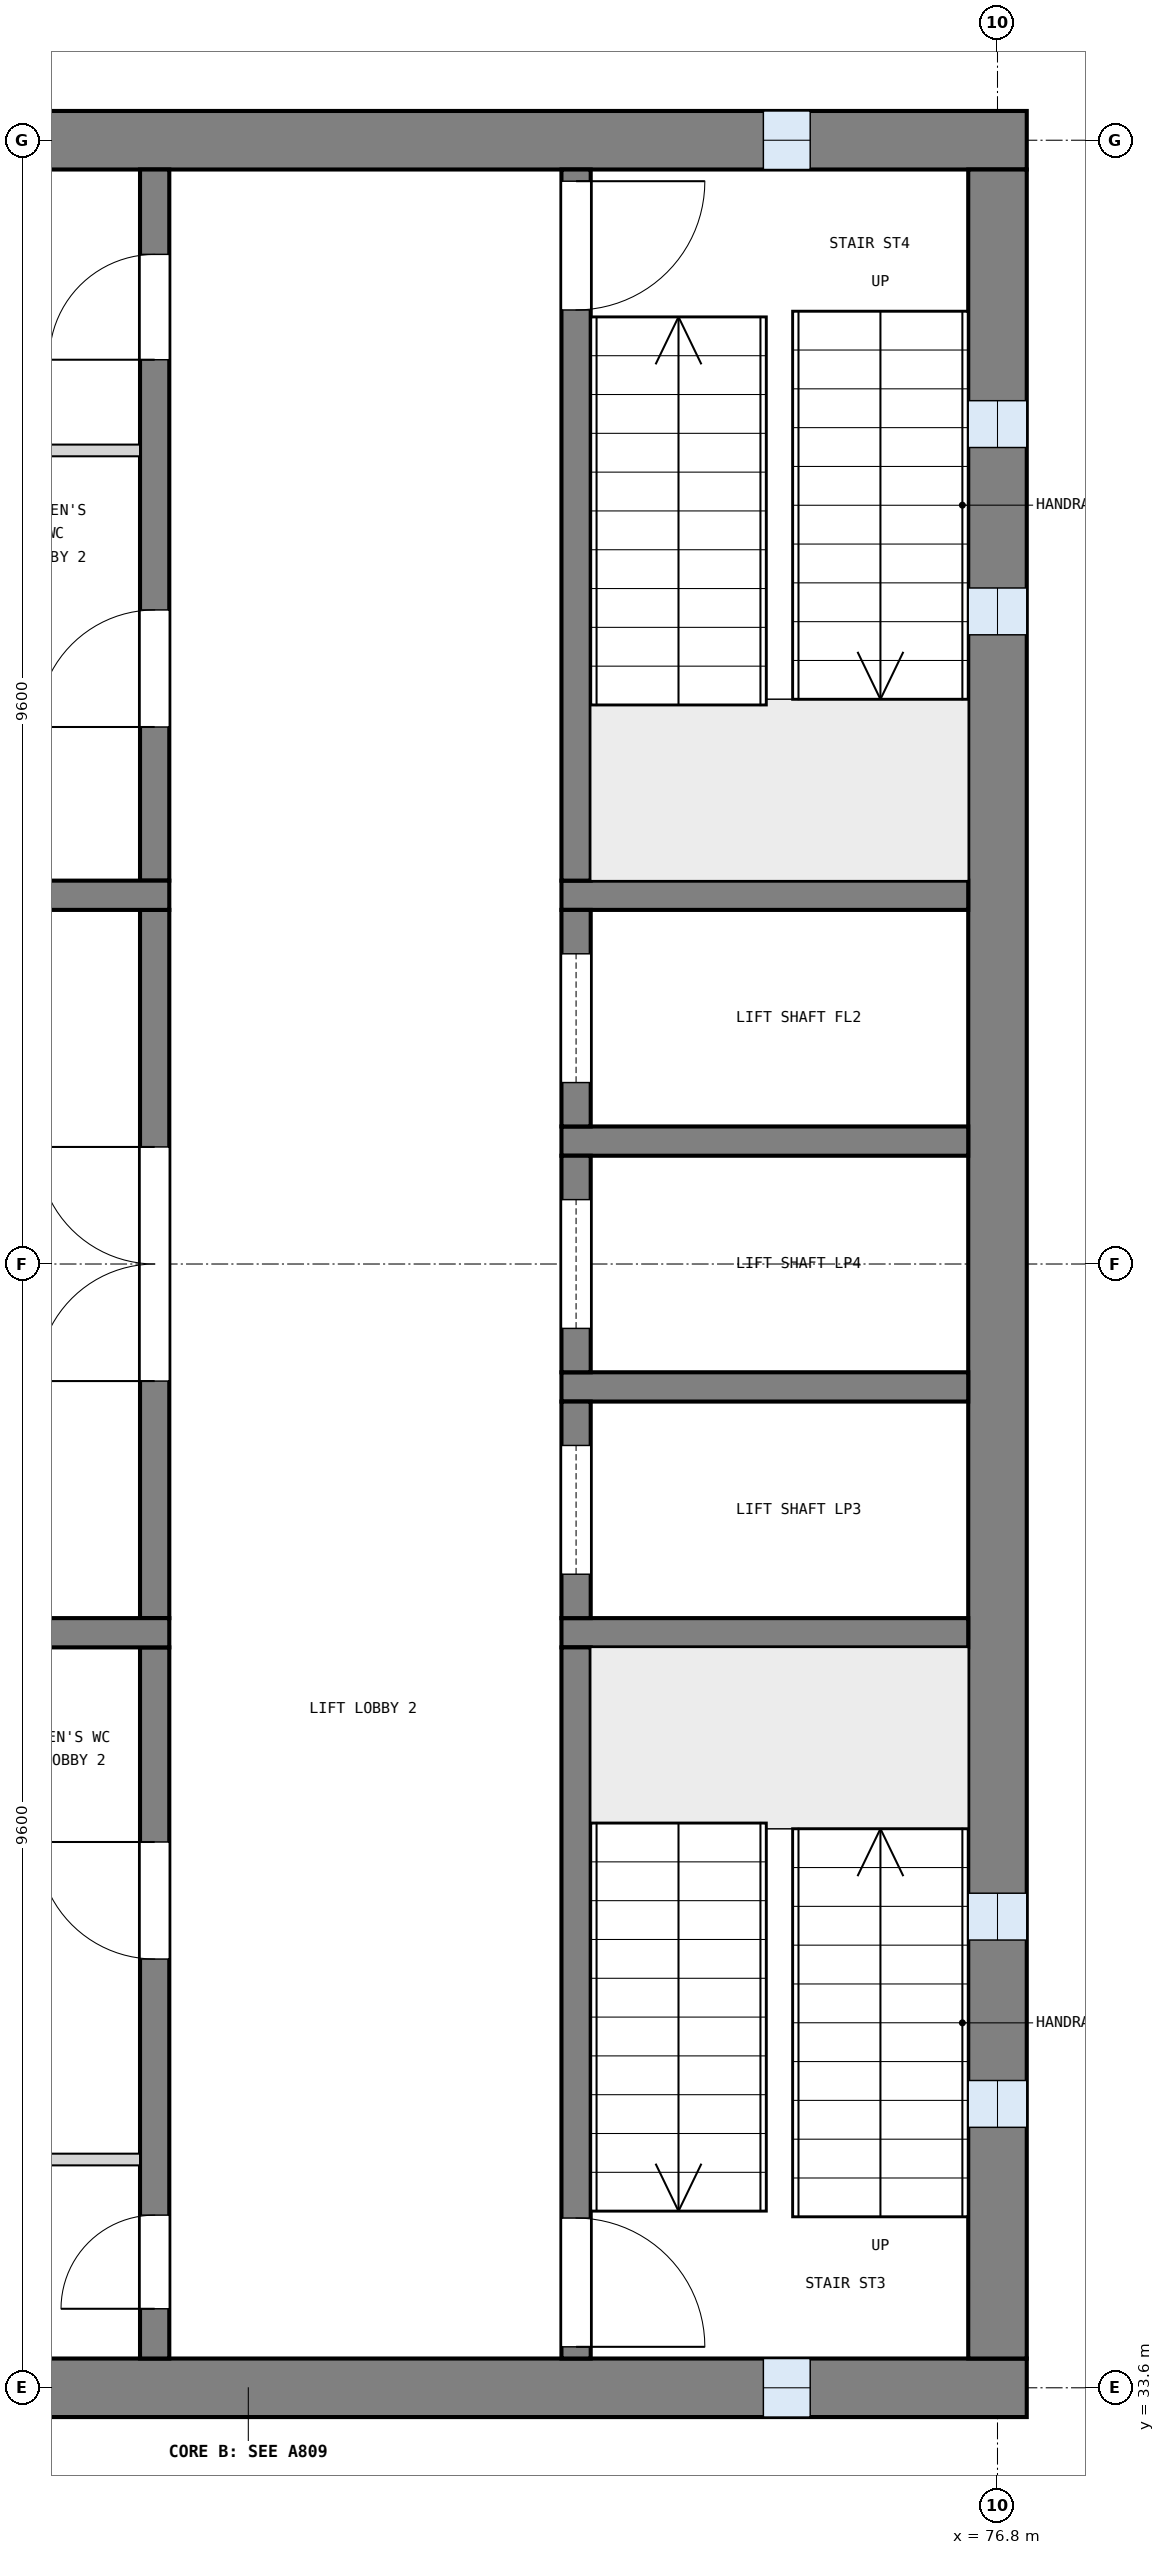
"""IFC4 building model, lengths in metres.
Left out: names, types, materials, properties, quantities, classifications, styles, units other than length and angle.
Written with IfcOpenShell. Run it as: python <this file> out.ifc"""

import sys

from ifc_helpers import new_model, si_unit, direction, frame, frame_2d, origin, place, context, subcontext, project, spatial, rectangle, extrude, element, fill, save


model = new_model("IFC4")
c1 = context("Model", 3, precision=1e-05, world=origin(), true_north=direction((0.0, 1.0)))
c2 = subcontext(c1, "Body", "Model", "MODEL_VIEW")
j1 = project(units=[si_unit("LENGTHUNIT", "METRE"), si_unit("PLANEANGLEUNIT", "RADIAN")], contexts=[c1])
p1 = place(None, origin())
s1 = spatial("IfcSite", under=j1, at=p1, CompositionType="ELEMENT")
p2 = place(p1, origin())
s2 = spatial("IfcBuilding", under=s1, at=p2, CompositionType="ELEMENT")
p3 = place(p2, frame((0.0, 0.0, 28.8)))
s3 = spatial("IfcBuildingStorey", under=s2, at=p3, CompositionType="ELEMENT", Elevation=28.8)
p4 = place(p3, frame((63.75, 52.8, 0.0), z_axis=(0.0, 0.0, 1.0), x_axis=(1.0, 0.0, 0.0)))
e1 = element("IfcWall", 1, at=p4, inside=s3, PredefinedType="SHEAR", context=c2, shape_type="SweptSolid", body=[
    extrude(rectangle(XDim=13.3, YDim=0.5, at=frame_2d((6.65, 0.0))), origin(), (0.0, 0.0, 1.0), 3.9),
])
p5 = place(p4, frame((11.05, 0.0, 1.0)))
e2 = element("IfcOpeningElement", 2, at=p5, cuts=e1, PredefinedType="OPENING", context=c2, shape_type="SweptSolid", body=[
    extrude(rectangle(XDim=0.4, YDim=2.0, at=frame_2d((0.2, 1.0))), frame((0.0, 0.26, 0.0), z_axis=(0.0, -1.0, 0.0), x_axis=(1.0, 0.0, 0.0)), (0.0, 0.0, 1.0), 0.52),
])
p6 = place(p3, frame((63.75, 33.6, 0.0), z_axis=(0.0, 0.0, 1.0), x_axis=(1.0, 0.0, 0.0)))
e3 = element("IfcWall", 3, at=p6, inside=s3, PredefinedType="SHEAR", context=c2, shape_type="SweptSolid", body=[
    extrude(rectangle(XDim=13.3, YDim=0.5, at=frame_2d((6.65, 0.0))), origin(), (0.0, 0.0, 1.0), 3.9),
])
p7 = place(p6, frame((11.05, 0.0, 1.0)))
e4 = element("IfcOpeningElement", 4, at=p7, cuts=e3, PredefinedType="OPENING", context=c2, shape_type="SweptSolid", body=[
    extrude(rectangle(XDim=0.4, YDim=2.0, at=frame_2d((0.2, 1.0))), frame((0.0, 0.26, 0.0), z_axis=(0.0, -1.0, 0.0), x_axis=(1.0, 0.0, 0.0)), (0.0, 0.0, 1.0), 0.52),
])
p8 = place(p3, frame((76.8, 33.85, 0.0), z_axis=(0.0, 0.0, 1.0), x_axis=(0.0, 1.0, 0.0)))
e5 = element("IfcWall", 5, at=p8, inside=s3, PredefinedType="SHEAR", context=c2, shape_type="SweptSolid", body=[
    extrude(rectangle(XDim=18.7, YDim=0.5, at=frame_2d((9.35, 0.0))), origin(), (0.0, 0.0, 1.0), 3.9),
])
p9 = place(p8, frame((1.975, 0.0, 1.0)))
e6 = element("IfcOpeningElement", 6, at=p9, cuts=e5, PredefinedType="OPENING", context=c2, shape_type="SweptSolid", body=[
    extrude(rectangle(XDim=0.4, YDim=2.0, at=frame_2d((0.2, 1.0))), frame((0.0, 0.26, 0.0), z_axis=(0.0, -1.0, 0.0), x_axis=(1.0, 0.0, 0.0)), (0.0, 0.0, 1.0), 0.52),
])
p10 = place(p8, frame((3.575, 0.0, 1.0)))
e7 = element("IfcOpeningElement", 7, at=p10, cuts=e5, PredefinedType="OPENING", context=c2, shape_type="SweptSolid", body=[
    extrude(rectangle(XDim=0.4, YDim=2.0, at=frame_2d((0.2, 1.0))), frame((0.0, 0.26, 0.0), z_axis=(0.0, -1.0, 0.0), x_axis=(1.0, 0.0, 0.0)), (0.0, 0.0, 1.0), 0.52),
])
p11 = place(p8, frame((14.725, 0.0, 1.0)))
e8 = element("IfcOpeningElement", 8, at=p11, cuts=e5, PredefinedType="OPENING", context=c2, shape_type="SweptSolid", body=[
    extrude(rectangle(XDim=0.4, YDim=2.0, at=frame_2d((0.2, 1.0))), frame((0.0, 0.26, 0.0), z_axis=(0.0, -1.0, 0.0), x_axis=(1.0, 0.0, 0.0)), (0.0, 0.0, 1.0), 0.52),
])
p12 = place(p8, frame((16.325, 0.0, 1.0)))
e9 = element("IfcOpeningElement", 9, at=p12, cuts=e5, PredefinedType="OPENING", context=c2, shape_type="SweptSolid", body=[
    extrude(rectangle(XDim=0.4, YDim=2.0, at=frame_2d((0.2, 1.0))), frame((0.0, 0.26, 0.0), z_axis=(0.0, -1.0, 0.0), x_axis=(1.0, 0.0, 0.0)), (0.0, 0.0, 1.0), 0.52),
])
for number, where, z_axis, x_axis in (
    (10, (76.55, 40.05, 0.0), (0.0, 0.0, 1.0), (-1.0, 0.0, 0.0)),
    (11, (76.55, 42.15, 0.0), (0.0, 0.0, 1.0), (-1.0, 0.0, 0.0)),
    (12, (76.55, 44.25, 0.0), (0.0, 0.0, 1.0), (-1.0, 0.0, 0.0)),
    (13, (76.55, 46.35, 0.0), (0.0, 0.0, 1.0), (-1.0, 0.0, 0.0)),
):
    element("IfcWall", number, at=place(p3, frame(where, z_axis=z_axis, x_axis=x_axis)), inside=s3, PredefinedType="SOLIDWALL", context=c2, shape_type="SweptSolid", body=[
        extrude(rectangle(XDim=3.475, YDim=0.25, at=frame_2d((1.738, 0.0))), origin(), (0.0, 0.0, 1.0), 3.6),
    ])
p13 = place(p3, frame((73.2, 33.85, 0.0), z_axis=(0.0, 0.0, 1.0), x_axis=(0.0, 1.0, 0.0)))
e14 = element("IfcWall", 14, at=p13, inside=s3, PredefinedType="SOLIDWALL", context=c2, shape_type="SweptSolid", body=[
    extrude(rectangle(XDim=6.075, YDim=0.25, at=frame_2d((3.038, 0.0))), origin(), (0.0, 0.0, 1.0), 3.6),
])
p14 = place(p13, frame((0.1, 0.0, 0.0)))
e15 = element("IfcOpeningElement", 15, at=p14, cuts=e14, PredefinedType="OPENING", context=c2, shape_type="SweptSolid", body=[
    extrude(rectangle(XDim=1.1, YDim=2.1, at=frame_2d((0.55, 1.05))), frame((0.0, 0.135, 0.0), z_axis=(0.0, -1.0, 0.0), x_axis=(1.0, 0.0, 0.0)), (0.0, 0.0, 1.0), 0.27),
])
p15 = place(p3, frame((73.2, 40.175, 0.0), z_axis=(0.0, 0.0, 1.0), x_axis=(0.0, 1.0, 0.0)))
e16 = element("IfcWall", 16, at=p15, inside=s3, PredefinedType="SOLIDWALL", context=c2, shape_type="SweptSolid", body=[
    extrude(rectangle(XDim=1.85, YDim=0.25, at=frame_2d((0.925, 0.0))), origin(), (0.0, 0.0, 1.0), 3.6),
])
p16 = place(p15, frame((0.375, 0.0, 0.0)))
e17 = element("IfcOpeningElement", 17, at=p16, cuts=e16, PredefinedType="OPENING", context=c2, shape_type="SweptSolid", body=[
    extrude(rectangle(XDim=1.1, YDim=2.1, at=frame_2d((0.55, 1.05))), frame((0.0, 0.135, 0.0), z_axis=(0.0, -1.0, 0.0), x_axis=(1.0, 0.0, 0.0)), (0.0, 0.0, 1.0), 0.27),
])
p17 = place(p3, frame((73.2, 42.275, 0.0), z_axis=(0.0, 0.0, 1.0), x_axis=(0.0, 1.0, 0.0)))
e18 = element("IfcWall", 18, at=p17, inside=s3, PredefinedType="SOLIDWALL", context=c2, shape_type="SweptSolid", body=[
    extrude(rectangle(XDim=1.85, YDim=0.25, at=frame_2d((0.925, 0.0))), origin(), (0.0, 0.0, 1.0), 3.6),
])
p18 = place(p17, frame((0.375, 0.0, 0.0)))
e19 = element("IfcOpeningElement", 19, at=p18, cuts=e18, PredefinedType="OPENING", context=c2, shape_type="SweptSolid", body=[
    extrude(rectangle(XDim=1.1, YDim=2.1, at=frame_2d((0.55, 1.05))), frame((0.0, 0.135, 0.0), z_axis=(0.0, -1.0, 0.0), x_axis=(1.0, 0.0, 0.0)), (0.0, 0.0, 1.0), 0.27),
])
p19 = place(p3, frame((73.2, 44.375, 0.0), z_axis=(0.0, 0.0, 1.0), x_axis=(0.0, 1.0, 0.0)))
e20 = element("IfcWall", 20, at=p19, inside=s3, PredefinedType="SOLIDWALL", context=c2, shape_type="SweptSolid", body=[
    extrude(rectangle(XDim=1.85, YDim=0.25, at=frame_2d((0.925, 0.0))), origin(), (0.0, 0.0, 1.0), 3.6),
])
p20 = place(p19, frame((0.375, 0.0, 0.0)))
e21 = element("IfcOpeningElement", 21, at=p20, cuts=e20, PredefinedType="OPENING", context=c2, shape_type="SweptSolid", body=[
    extrude(rectangle(XDim=1.1, YDim=2.1, at=frame_2d((0.55, 1.05))), frame((0.0, 0.135, 0.0), z_axis=(0.0, -1.0, 0.0), x_axis=(1.0, 0.0, 0.0)), (0.0, 0.0, 1.0), 0.27),
])
p21 = place(p3, frame((73.2, 46.475, 0.0), z_axis=(0.0, 0.0, 1.0), x_axis=(0.0, 1.0, 0.0)))
e22 = element("IfcWall", 22, at=p21, inside=s3, PredefinedType="SOLIDWALL", context=c2, shape_type="SweptSolid", body=[
    extrude(rectangle(XDim=6.075, YDim=0.25, at=frame_2d((3.038, 0.0))), origin(), (0.0, 0.0, 1.0), 3.6),
])
p22 = place(p21, frame((4.875, 0.0, 0.0)))
e23 = element("IfcOpeningElement", 23, at=p22, cuts=e22, PredefinedType="OPENING", context=c2, shape_type="SweptSolid", body=[
    extrude(rectangle(XDim=1.1, YDim=2.1, at=frame_2d((0.55, 1.05))), frame((0.0, 0.135, 0.0), z_axis=(0.0, -1.0, 0.0), x_axis=(1.0, 0.0, 0.0)), (0.0, 0.0, 1.0), 0.27),
])
p23 = place(p3, frame((69.6, 33.85, 0.0), z_axis=(0.0, 0.0, 1.0), x_axis=(0.0, 1.0, 0.0)))
e24 = element("IfcWall", 24, at=p23, inside=s3, PredefinedType="SOLIDWALL", context=c2, shape_type="SweptSolid", body=[
    extrude(rectangle(XDim=6.075, YDim=0.25, at=frame_2d((3.038, 0.0))), origin(), (0.0, 0.0, 1.0), 3.6),
])
p24 = place(p23, frame((0.425, 0.0, 0.0)))
e25 = element("IfcOpeningElement", 25, at=p24, cuts=e24, PredefinedType="OPENING", context=c2, shape_type="SweptSolid", body=[
    extrude(rectangle(XDim=0.8, YDim=2.1, at=frame_2d((0.4, 1.05))), frame((0.0, 0.135, 0.0), z_axis=(0.0, -1.0, 0.0), x_axis=(1.0, 0.0, 0.0)), (0.0, 0.0, 1.0), 0.27),
])
p25 = place(p23, frame((3.413, 0.0, 0.0)))
e26 = element("IfcOpeningElement", 26, at=p25, cuts=e24, PredefinedType="OPENING", context=c2, shape_type="SweptSolid", body=[
    extrude(rectangle(XDim=1.0, YDim=2.1, at=frame_2d((0.5, 1.05))), frame((0.0, 0.135, 0.0), z_axis=(0.0, -1.0, 0.0), x_axis=(1.0, 0.0, 0.0)), (0.0, 0.0, 1.0), 0.27),
])
p26 = place(p3, frame((69.6, 40.175, 0.0), z_axis=(0.0, 0.0, 1.0), x_axis=(0.0, 1.0, 0.0)))
e27 = element("IfcWall", 27, at=p26, inside=s3, PredefinedType="SOLIDWALL", context=c2, shape_type="SweptSolid", body=[
    extrude(rectangle(XDim=6.05, YDim=0.25, at=frame_2d((3.025, 0.0))), origin(), (0.0, 0.0, 1.0), 3.6),
])
p27 = place(p26, frame((2.025, 0.0, 0.0)))
e28 = element("IfcOpeningElement", 28, at=p27, cuts=e27, PredefinedType="OPENING", context=c2, shape_type="SweptSolid", body=[
    extrude(rectangle(XDim=2.0, YDim=2.1, at=frame_2d((1.0, 1.05))), frame((0.0, 0.135, 0.0), z_axis=(0.0, -1.0, 0.0), x_axis=(1.0, 0.0, 0.0)), (0.0, 0.0, 1.0), 0.27),
])
p28 = place(p3, frame((69.6, 46.475, 0.0), z_axis=(0.0, 0.0, 1.0), x_axis=(0.0, 1.0, 0.0)))
e29 = element("IfcWall", 29, at=p28, inside=s3, PredefinedType="SOLIDWALL", context=c2, shape_type="SweptSolid", body=[
    extrude(rectangle(XDim=6.075, YDim=0.25, at=frame_2d((3.038, 0.0))), origin(), (0.0, 0.0, 1.0), 3.6),
])
p29 = place(p28, frame((1.312, 0.0, 0.0)))
e30 = element("IfcOpeningElement", 30, at=p29, cuts=e29, PredefinedType="OPENING", context=c2, shape_type="SweptSolid", body=[
    extrude(rectangle(XDim=1.0, YDim=2.1, at=frame_2d((0.5, 1.05))), frame((0.0, 0.135, 0.0), z_axis=(0.0, -1.0, 0.0), x_axis=(1.0, 0.0, 0.0)), (0.0, 0.0, 1.0), 0.27),
])
p30 = place(p28, frame((4.45, 0.0, 0.0)))
e31 = element("IfcOpeningElement", 31, at=p30, cuts=e29, PredefinedType="OPENING", context=c2, shape_type="SweptSolid", body=[
    extrude(rectangle(XDim=0.9, YDim=2.1, at=frame_2d((0.45, 1.05))), frame((0.0, 0.135, 0.0), z_axis=(0.0, -1.0, 0.0), x_axis=(1.0, 0.0, 0.0)), (0.0, 0.0, 1.0), 0.27),
])
for number, where, z_axis, x_axis in (
    (32, (69.725, 40.05, 0.0), (0.0, 0.0, 1.0), (-1.0, 0.0, 0.0)),
    (33, (69.725, 46.35, 0.0), (0.0, 0.0, 1.0), (-1.0, 0.0, 0.0)),
):
    element("IfcWall", number, at=place(p3, frame(where, z_axis=z_axis, x_axis=x_axis)), inside=s3, PredefinedType="SOLIDWALL", context=c2, shape_type="SweptSolid", body=[
        extrude(rectangle(XDim=5.475, YDim=0.25, at=frame_2d((2.738, 0.0))), origin(), (0.0, 0.0, 1.0), 3.6),
    ])
for number, where, z_axis, x_axis in (
    (34, (69.475, 35.55, 0.0), (0.0, 0.0, 1.0), (-1.0, 0.0, 0.0)),
    (35, (69.475, 50.15, 0.0), (0.0, 0.0, 1.0), (-1.0, 0.0, 0.0)),
):
    element("IfcWall", number, at=place(p3, frame(where, z_axis=z_axis, x_axis=x_axis)), inside=s3, PredefinedType="PARTITIONING", context=c2, shape_type="SweptSolid", body=[
        extrude(rectangle(XDim=5.225, YDim=0.1, at=frame_2d((2.613, 0.0))), origin(), (0.0, 0.0, 1.0), 3.6),
    ])
p31 = place(p9, origin())
e36 = element("IfcWindow", 36, at=p31, inside=s3, PartitioningType="SINGLE_PANEL", PredefinedType="WINDOW", context=c2, shape_type="SweptSolid", body=[
    extrude(rectangle(XDim=0.4, YDim=2.0, at=frame_2d((0.2, 1.0))), frame((0.0, 0.03, 0.0), z_axis=(0.0, -1.0, 0.0), x_axis=(1.0, 0.0, 0.0)), (0.0, 0.0, 1.0), 0.06),
])
fill(e6, e36)
p32 = place(p10, origin())
e37 = element("IfcWindow", 37, at=p32, inside=s3, PartitioningType="SINGLE_PANEL", PredefinedType="WINDOW", context=c2, shape_type="SweptSolid", body=[
    extrude(rectangle(XDim=0.4, YDim=2.0, at=frame_2d((0.2, 1.0))), frame((0.0, 0.03, 0.0), z_axis=(0.0, -1.0, 0.0), x_axis=(1.0, 0.0, 0.0)), (0.0, 0.0, 1.0), 0.06),
])
fill(e7, e37)
p33 = place(p11, origin())
e38 = element("IfcWindow", 38, at=p33, inside=s3, PartitioningType="SINGLE_PANEL", PredefinedType="WINDOW", context=c2, shape_type="SweptSolid", body=[
    extrude(rectangle(XDim=0.4, YDim=2.0, at=frame_2d((0.2, 1.0))), frame((0.0, 0.03, 0.0), z_axis=(0.0, -1.0, 0.0), x_axis=(1.0, 0.0, 0.0)), (0.0, 0.0, 1.0), 0.06),
])
fill(e8, e38)
p34 = place(p12, origin())
e39 = element("IfcWindow", 39, at=p34, inside=s3, PartitioningType="SINGLE_PANEL", PredefinedType="WINDOW", context=c2, shape_type="SweptSolid", body=[
    extrude(rectangle(XDim=0.4, YDim=2.0, at=frame_2d((0.2, 1.0))), frame((0.0, 0.03, 0.0), z_axis=(0.0, -1.0, 0.0), x_axis=(1.0, 0.0, 0.0)), (0.0, 0.0, 1.0), 0.06),
])
fill(e9, e39)
p35 = place(p7, origin())
e40 = element("IfcWindow", 40, at=p35, inside=s3, PartitioningType="SINGLE_PANEL", PredefinedType="WINDOW", context=c2, shape_type="SweptSolid", body=[
    extrude(rectangle(XDim=0.4, YDim=2.0, at=frame_2d((0.2, 1.0))), frame((0.0, 0.03, 0.0), z_axis=(0.0, -1.0, 0.0), x_axis=(1.0, 0.0, 0.0)), (0.0, 0.0, 1.0), 0.06),
])
fill(e4, e40)
p36 = place(p5, origin())
e41 = element("IfcWindow", 41, at=p36, inside=s3, PartitioningType="SINGLE_PANEL", PredefinedType="WINDOW", context=c2, shape_type="SweptSolid", body=[
    extrude(rectangle(XDim=0.4, YDim=2.0, at=frame_2d((0.2, 1.0))), frame((0.0, 0.03, 0.0), z_axis=(0.0, -1.0, 0.0), x_axis=(1.0, 0.0, 0.0)), (0.0, 0.0, 1.0), 0.06),
])
fill(e2, e41)
p37 = place(p14, frame((1.1, 0.0, 0.0), z_axis=(0.0, 0.0, 1.0), x_axis=(-1.0, 0.0, 0.0)))
e42 = element("IfcDoor", 42, at=p37, inside=s3, OperationType="SINGLE_SWING_RIGHT", PredefinedType="DOOR", context=c2, shape_type="SweptSolid", body=[
    extrude(rectangle(XDim=1.1, YDim=2.1, at=frame_2d((0.55, 1.05))), frame((0.0, 0.025, 0.0), z_axis=(0.0, -1.0, 0.0), x_axis=(1.0, 0.0, 0.0)), (0.0, 0.0, 1.0), 0.05),
])
fill(e15, e42)
p38 = place(p22, frame((1.1, 0.0, 0.0), z_axis=(0.0, 0.0, 1.0), x_axis=(-1.0, 0.0, 0.0)))
e43 = element("IfcDoor", 43, at=p38, inside=s3, OperationType="SINGLE_SWING_LEFT", PredefinedType="DOOR", context=c2, shape_type="SweptSolid", body=[
    extrude(rectangle(XDim=1.1, YDim=2.1, at=frame_2d((0.55, 1.05))), frame((0.0, 0.025, 0.0), z_axis=(0.0, -1.0, 0.0), x_axis=(1.0, 0.0, 0.0)), (0.0, 0.0, 1.0), 0.05),
])
fill(e23, e43)
p39 = place(p16, origin())
e44 = element("IfcDoor", 44, at=p39, inside=s3, OperationType="SLIDING_TO_LEFT", PredefinedType="DOOR", context=c2, shape_type="SweptSolid", body=[
    extrude(rectangle(XDim=1.1, YDim=2.1, at=frame_2d((0.55, 1.05))), frame((0.0, 0.025, 0.0), z_axis=(0.0, -1.0, 0.0), x_axis=(1.0, 0.0, 0.0)), (0.0, 0.0, 1.0), 0.05),
])
fill(e17, e44)
p40 = place(p18, origin())
e45 = element("IfcDoor", 45, at=p40, inside=s3, OperationType="SLIDING_TO_LEFT", PredefinedType="DOOR", context=c2, shape_type="SweptSolid", body=[
    extrude(rectangle(XDim=1.1, YDim=2.1, at=frame_2d((0.55, 1.05))), frame((0.0, 0.025, 0.0), z_axis=(0.0, -1.0, 0.0), x_axis=(1.0, 0.0, 0.0)), (0.0, 0.0, 1.0), 0.05),
])
fill(e19, e45)
p41 = place(p20, origin())
e46 = element("IfcDoor", 46, at=p41, inside=s3, OperationType="SLIDING_TO_LEFT", PredefinedType="DOOR", context=c2, shape_type="SweptSolid", body=[
    extrude(rectangle(XDim=1.1, YDim=2.1, at=frame_2d((0.55, 1.05))), frame((0.0, 0.025, 0.0), z_axis=(0.0, -1.0, 0.0), x_axis=(1.0, 0.0, 0.0)), (0.0, 0.0, 1.0), 0.05),
])
fill(e21, e46)
p42 = place(p27, origin())
e47 = element("IfcDoor", 47, at=p42, inside=s3, OperationType="DOUBLE_DOOR_SINGLE_SWING", PredefinedType="DOOR", context=c2, shape_type="SweptSolid", body=[
    extrude(rectangle(XDim=2.0, YDim=2.1, at=frame_2d((1.0, 1.05))), frame((0.0, 0.025, 0.0), z_axis=(0.0, -1.0, 0.0), x_axis=(1.0, 0.0, 0.0)), (0.0, 0.0, 1.0), 0.05),
])
fill(e28, e47)
p43 = place(p24, origin())
e48 = element("IfcDoor", 48, at=p43, inside=s3, OperationType="SINGLE_SWING_LEFT", PredefinedType="DOOR", context=c2, shape_type="SweptSolid", body=[
    extrude(rectangle(XDim=0.8, YDim=2.1, at=frame_2d((0.4, 1.05))), frame((0.0, 0.025, 0.0), z_axis=(0.0, -1.0, 0.0), x_axis=(1.0, 0.0, 0.0)), (0.0, 0.0, 1.0), 0.05),
])
fill(e25, e48)
p44 = place(p25, origin())
e49 = element("IfcDoor", 49, at=p44, inside=s3, OperationType="SINGLE_SWING_RIGHT", PredefinedType="DOOR", context=c2, shape_type="SweptSolid", body=[
    extrude(rectangle(XDim=1.0, YDim=2.1, at=frame_2d((0.5, 1.05))), frame((0.0, 0.025, 0.0), z_axis=(0.0, -1.0, 0.0), x_axis=(1.0, 0.0, 0.0)), (0.0, 0.0, 1.0), 0.05),
])
fill(e26, e49)
p45 = place(p29, origin())
e50 = element("IfcDoor", 50, at=p45, inside=s3, OperationType="SINGLE_SWING_LEFT", PredefinedType="DOOR", context=c2, shape_type="SweptSolid", body=[
    extrude(rectangle(XDim=1.0, YDim=2.1, at=frame_2d((0.5, 1.05))), frame((0.0, 0.025, 0.0), z_axis=(0.0, -1.0, 0.0), x_axis=(1.0, 0.0, 0.0)), (0.0, 0.0, 1.0), 0.05),
])
fill(e30, e50)
p46 = place(p30, origin())
e51 = element("IfcDoor", 51, at=p46, inside=s3, OperationType="SINGLE_SWING_LEFT", PredefinedType="DOOR", context=c2, shape_type="SweptSolid", body=[
    extrude(rectangle(XDim=0.9, YDim=2.1, at=frame_2d((0.45, 1.05))), frame((0.0, 0.025, 0.0), z_axis=(0.0, -1.0, 0.0), x_axis=(1.0, 0.0, 0.0)), (0.0, 0.0, 1.0), 0.05),
])
fill(e31, e51)
save(model, sys.argv[1])
